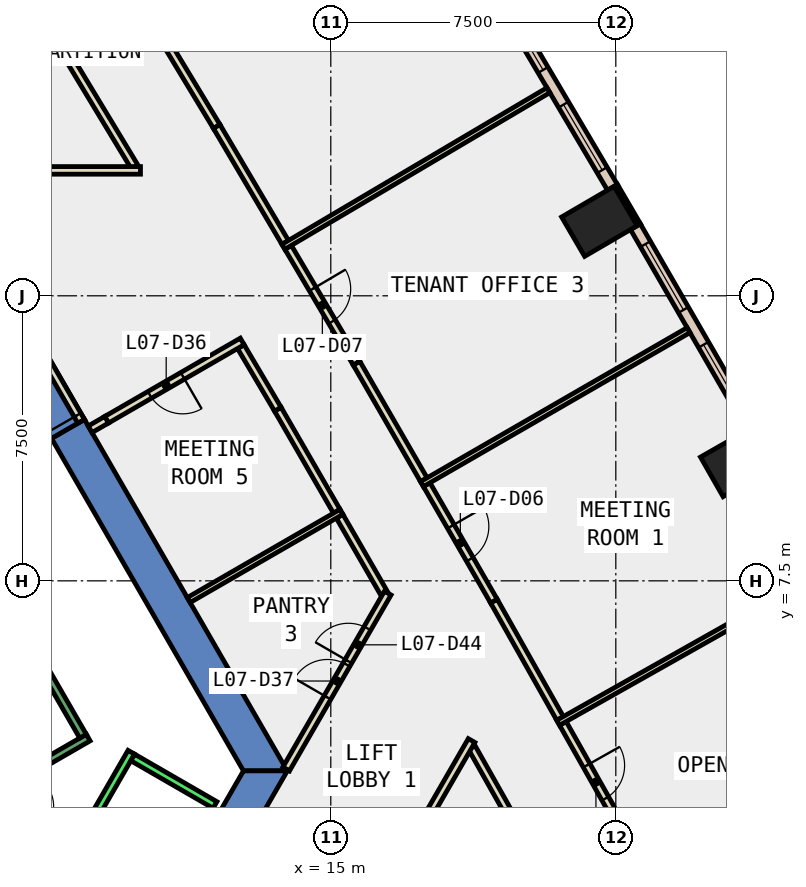
"""IFC4 building model, lengths in metres.
Left out: names, types, materials, properties, quantities, classifications, styles, units other than length and angle.
Written with IfcOpenShell. Run it as: python <this file> out.ifc"""

import sys

from ifc_helpers import new_model, si_unit, direction, frame, frame_2d, origin, origin_2d, place, context, subcontext, project, spatial, polyline, rectangle, outline, extrude, element, fill, save


model = new_model("IFC4")
c1 = context("Model", 3, precision=1e-05, world=origin(), true_north=direction((0.0, 1.0)))
c2 = subcontext(c1, "Body", "Model", "MODEL_VIEW")
j1 = project(units=[si_unit("LENGTHUNIT", "METRE"), si_unit("PLANEANGLEUNIT", "RADIAN")], contexts=[c1])
p1 = place(None, origin())
s1 = spatial("IfcSite", under=j1, at=p1, CompositionType="ELEMENT")
p2 = place(p1, origin())
s2 = spatial("IfcBuilding", under=s1, at=p2, CompositionType="ELEMENT")
p3 = place(p2, frame((0.0, 0.0, 39.2)))
s3 = spatial("IfcBuildingStorey", under=s2, at=p3, CompositionType="ELEMENT", Elevation=39.2)
for number, where, z_axis, x_axis in (
    (1, (25.721, 10.632, -0.4), (0.0, 0.0, 1.0), (-0.496, 0.869, 0.0)),
    (2, (22.068, 16.959, -0.4), (0.0, 0.0, 1.0), (-0.504, 0.864, 0.0)),
):
    element("IfcColumn", number, at=place(p3, frame(where, z_axis=z_axis, x_axis=x_axis)), inside=s3, PredefinedType="COLUMN", context=c2, shape_type="SweptSolid", body=[
        extrude(rectangle(XDim=1.2, YDim=1.6, at=origin_2d()), origin(), (0.0, 0.0, 1.0), 4.2),
    ])
p4 = place(p3, frame((0.0, 0.0, -0.4)))
e3 = element("IfcWall", 3, at=p4, inside=s3, PredefinedType="SHEAR", context=c2, shape_type="SweptSolid", body=[
    extrude(outline(polyline([(8.517, 11.748), (7.651, 11.248), (12.702, 2.5), (13.856, 2.5), (8.517, 11.748)])), origin(), (0.0, 0.0, 1.0), 4.2),
])
p5 = place(p3, frame((0.0, 0.0, 3.6)))
e4 = element("IfcWall", 4, at=p5, inside=s3, PredefinedType="SHEAR", context=c2, shape_type="SweptSolid", body=[
    extrude(outline(polyline([(7.517, 13.48), (6.651, 12.98), (7.651, 11.248), (8.517, 11.748), (7.517, 13.48)])), origin(), (0.0, 0.0, 1.0), 0.2),
])
p6 = place(p3, frame((0.0, 0.0, -0.4)))
e5 = element("IfcWall", 5, at=p6, inside=s3, PredefinedType="SHEAR", context=c2, shape_type="SweptSolid", body=[
    extrude(outline(polyline([(11.801, 0.94), (12.667, 0.44), (13.856, 2.5), (12.702, 2.5), (11.801, 0.94)])), origin(), (0.0, 0.0, 1.0), 4.2),
])
p7 = place(p3, frame((23.104, 16.87, 0.0), z_axis=(0.0, 0.0, 1.0), x_axis=(-0.504313844903, 0.863520437418, 0.0)))
e6 = element("IfcWall", 6, at=p7, inside=s3, PredefinedType="STANDARD", context=c2, shape_type="SweptSolid", body=[
    extrude(rectangle(XDim=1.2, YDim=0.1, at=frame_2d((0.6, 0.0))), origin(), (0.0, 0.0, 1.0), 3.8),
])
p8 = place(p3, frame((26.073, 11.522, 0.0), z_axis=(0.0, 0.0, 1.0), x_axis=(-0.499976985038, 0.866038691071, 0.0)))
e7 = element("IfcWall", 7, at=p8, inside=s3, PredefinedType="STANDARD", context=c2, shape_type="SweptSolid", body=[
    extrude(rectangle(XDim=6.116, YDim=0.3, at=frame_2d((3.058, 0.0))), origin(), (0.0, 0.0, 1.0), 3.8),
])
p9 = place(p8, frame((0.529, 0.0, 0.9)))
e8 = element("IfcOpeningElement", 8, at=p9, cuts=e7, PredefinedType="OPENING", context=c2, shape_type="SweptSolid", body=[
    extrude(rectangle(XDim=2.0, YDim=2.6, at=frame_2d((1.0, 1.3))), frame((0.0, 0.16, 0.0), z_axis=(0.0, -1.0, 0.0), x_axis=(1.0, 0.0, 0.0)), (0.0, 0.0, 1.0), 0.32),
])
p10 = place(p8, frame((3.587, 0.0, 0.9)))
e9 = element("IfcOpeningElement", 9, at=p10, cuts=e7, PredefinedType="OPENING", context=c2, shape_type="SweptSolid", body=[
    extrude(rectangle(XDim=2.0, YDim=2.6, at=frame_2d((1.0, 1.3))), frame((0.0, 0.16, 0.0), z_axis=(0.0, -1.0, 0.0), x_axis=(1.0, 0.0, 0.0)), (0.0, 0.0, 1.0), 0.32),
])
p11 = place(p3, frame((22.411, 17.853, 0.0), z_axis=(0.0, 0.0, 1.0), x_axis=(-0.508749483145, 0.860914608658, 0.0)))
e10 = element("IfcWall", 10, at=p11, inside=s3, PredefinedType="STANDARD", context=c2, shape_type="SweptSolid", body=[
    extrude(rectangle(XDim=6.117, YDim=0.3, at=frame_2d((3.058, 0.0))), origin(), (0.0, 0.0, 1.0), 3.8),
])
p12 = place(p11, frame((0.529, 0.0, 0.9)))
e11 = element("IfcOpeningElement", 11, at=p12, cuts=e10, PredefinedType="OPENING", context=c2, shape_type="SweptSolid", body=[
    extrude(rectangle(XDim=2.0, YDim=2.6, at=frame_2d((1.0, 1.3))), frame((0.0, 0.16, 0.0), z_axis=(0.0, -1.0, 0.0), x_axis=(1.0, 0.0, 0.0)), (0.0, 0.0, 1.0), 0.32),
])
p13 = place(p11, frame((3.588, 0.0, 0.9)))
e12 = element("IfcOpeningElement", 12, at=p13, cuts=e10, PredefinedType="OPENING", context=c2, shape_type="SweptSolid", body=[
    extrude(rectangle(XDim=2.0, YDim=2.6, at=frame_2d((1.0, 1.3))), frame((0.0, 0.16, 0.0), z_axis=(0.0, -1.0, 0.0), x_axis=(1.0, 0.0, 0.0)), (0.0, 0.0, 1.0), 0.32),
])
p14 = place(p3, frame((15.157, 9.33, 0.0), z_axis=(0.0, 0.0, 1.0), x_axis=(-0.500058580706, 0.865991579556, 0.0)))
e13 = element("IfcWall", 13, at=p14, inside=s3, PredefinedType="PARTITIONING", context=c2, shape_type="SweptSolid", body=[
    extrude(rectangle(XDim=3.102, YDim=0.2, at=frame_2d((1.551, 0.0))), origin(), (0.0, 0.0, 1.0), 3.8),
])
p15 = place(p3, frame((13.606, 12.016, 0.0), z_axis=(0.0, 0.0, 1.0), x_axis=(-0.508832553058, 0.860865513857, 0.0)))
e14 = element("IfcWall", 14, at=p15, inside=s3, PredefinedType="PARTITIONING", context=c2, shape_type="SweptSolid", body=[
    extrude(rectangle(XDim=1.912, YDim=0.2, at=frame_2d((0.956, 0.0))), origin(), (0.0, 0.0, 1.0), 3.8),
])
p16 = place(p3, frame((12.669, 13.799, 0.0), z_axis=(0.0, 0.0, 1.0), x_axis=(-0.865966559136, -0.500101908074, 0.0)))
e15 = element("IfcWall", 15, at=p16, inside=s3, PredefinedType="PARTITIONING", context=c2, shape_type="SweptSolid", body=[
    extrude(rectangle(XDim=4.121, YDim=0.2, at=frame_2d((2.061, 0.0))), origin(), (0.0, 0.0, 1.0), 3.8),
])
p17 = place(p16, frame((1.81, 0.0, 0.0)))
e16 = element("IfcOpeningElement", 16, at=p17, cuts=e15, PredefinedType="OPENING", context=c2, shape_type="SweptSolid", body=[
    extrude(rectangle(XDim=1.0, YDim=2.1, at=frame_2d((0.5, 1.05))), frame((0.0, 0.11, 0.0), z_axis=(0.0, -1.0, 0.0), x_axis=(1.0, 0.0, 0.0)), (0.0, 0.0, 1.0), 0.22),
])
p18 = place(p3, frame((16.399, 7.178, 0.0), z_axis=(0.0, 0.0, 1.0), x_axis=(-0.499873332494, 0.866098522953, 0.0)))
e17 = element("IfcWall", 17, at=p18, inside=s3, PredefinedType="PARTITIONING", context=c2, shape_type="SweptSolid", body=[
    extrude(rectangle(XDim=2.334, YDim=0.2, at=frame_2d((1.167, 0.0))), origin(), (0.0, 0.0, 1.0), 3.8),
])
p19 = place(p3, frame((9.84, 18.386, 0.0), z_axis=(0.0, 0.0, 1.0), x_axis=(-0.51736780002, 0.85576314451, 0.0)))
e18 = element("IfcWall", 18, at=p19, inside=s3, PredefinedType="PARTITIONING", context=c2, shape_type="SweptSolid", body=[
    extrude(rectangle(XDim=7.018, YDim=0.2, at=frame_2d((3.509, 0.0))), origin(), (0.0, 0.0, 1.0), 3.8),
])
p20 = place(p3, frame((20.751, -0.505, 0.0), z_axis=(0.0, 0.0, 1.0), x_axis=(-0.491284712602, 0.870999041999, 0.0)))
e19 = element("IfcWall", 19, at=p20, inside=s3, PredefinedType="PARTITIONING", context=c2, shape_type="SweptSolid", body=[
    extrude(rectangle(XDim=4.166, YDim=0.2, at=frame_2d((2.083, 0.0))), origin(), (0.0, 0.0, 1.0), 3.8),
])
p21 = place(p3, frame((21.107, 3.749, 0.0), z_axis=(0.0, 0.0, 1.0), x_axis=(0.491268894998, -0.871007963687, 0.0)))
e20 = element("IfcWall", 20, at=p21, inside=s3, PredefinedType="PARTITIONING", context=c2, shape_type="SweptSolid", body=[
    extrude(rectangle(XDim=3.542, YDim=0.2, at=frame_2d((1.771, 0.0))), origin(), (0.0, 0.0, 1.0), 3.8),
])
p22 = place(p21, frame((1.271, 0.0, 0.0)))
e21 = element("IfcOpeningElement", 21, at=p22, cuts=e20, PredefinedType="OPENING", context=c2, shape_type="SweptSolid", body=[
    extrude(rectangle(XDim=1.0, YDim=2.1, at=frame_2d((0.5, 1.05))), frame((0.0, 0.11, 0.0), z_axis=(0.0, -1.0, 0.0), x_axis=(1.0, 0.0, 0.0)), (0.0, 0.0, 1.0), 0.22),
])
p23 = place(p3, frame((17.524, 10.031, 0.0), z_axis=(0.0, 0.0, 1.0), x_axis=(0.499861717316, -0.86610522661, 0.0)))
e22 = element("IfcWall", 22, at=p23, inside=s3, PredefinedType="PARTITIONING", context=c2, shape_type="SweptSolid", body=[
    extrude(rectangle(XDim=3.541, YDim=0.2, at=frame_2d((1.771, 0.0))), origin(), (0.0, 0.0, 1.0), 3.8),
])
p24 = place(p23, frame((1.27, 0.0, 0.0)))
e23 = element("IfcOpeningElement", 23, at=p24, cuts=e22, PredefinedType="OPENING", context=c2, shape_type="SweptSolid", body=[
    extrude(rectangle(XDim=1.0, YDim=2.1, at=frame_2d((0.5, 1.05))), frame((0.0, 0.11, 0.0), z_axis=(0.0, -1.0, 0.0), x_axis=(1.0, 0.0, 0.0)), (0.0, 0.0, 1.0), 0.22),
])
p25 = place(p3, frame((19.294, 6.964, 0.0), z_axis=(0.0, 0.0, 1.0), x_axis=(0.491148159943, -0.871076050058, 0.0)))
e24 = element("IfcWall", 24, at=p25, inside=s3, PredefinedType="PARTITIONING", context=c2, shape_type="SweptSolid", body=[
    extrude(rectangle(XDim=3.541, YDim=0.2, at=frame_2d((1.771, 0.0))), origin(), (0.0, 0.0, 1.0), 3.8),
])
p26 = place(p3, frame((13.877, 16.275, 0.0), z_axis=(0.0, 0.0, 1.0), x_axis=(0.508613166028, -0.860995149431, 0.0)))
e25 = element("IfcWall", 25, at=p26, inside=s3, PredefinedType="PARTITIONING", context=c2, shape_type="SweptSolid", body=[
    extrude(rectangle(XDim=3.541, YDim=0.2, at=frame_2d((1.771, 0.0))), origin(), (0.0, 0.0, 1.0), 3.8),
])
p27 = place(p26, frame((1.271, 0.0, 0.0)))
e26 = element("IfcOpeningElement", 26, at=p27, cuts=e25, PredefinedType="OPENING", context=c2, shape_type="SweptSolid", body=[
    extrude(rectangle(XDim=1.0, YDim=2.1, at=frame_2d((0.5, 1.05))), frame((0.0, 0.11, 0.0), z_axis=(0.0, -1.0, 0.0), x_axis=(1.0, 0.0, 0.0)), (0.0, 0.0, 1.0), 0.22),
])
p28 = place(p3, frame((15.678, 13.226, 0.0), z_axis=(0.0, 0.0, 1.0), x_axis=(0.499951278228, -0.866053531485, 0.0)))
e27 = element("IfcWall", 27, at=p28, inside=s3, PredefinedType="PARTITIONING", context=c2, shape_type="SweptSolid", body=[
    extrude(rectangle(XDim=3.54, YDim=0.2, at=frame_2d((1.77, 0.0))), origin(), (0.0, 0.0, 1.0), 3.8),
])
p29 = place(p3, frame((8.218, 25.708, 0.0), z_axis=(0.0, 0.0, 1.0), x_axis=(0.517278800461, -0.855816944559, 0.0)))
e28 = element("IfcWall", 28, at=p29, inside=s3, PredefinedType="PARTITIONING", context=c2, shape_type="SweptSolid", body=[
    extrude(rectangle(XDim=7.308, YDim=0.2, at=frame_2d((3.654, 0.0))), origin(), (0.0, 0.0, 1.0), 3.8),
])
p30 = place(p29, frame((3.154, 0.0, 0.0)))
e29 = element("IfcOpeningElement", 29, at=p30, cuts=e28, PredefinedType="OPENING", context=c2, shape_type="SweptSolid", body=[
    extrude(rectangle(XDim=1.0, YDim=2.1, at=frame_2d((0.5, 1.05))), frame((0.0, 0.11, 0.0), z_axis=(0.0, -1.0, 0.0), x_axis=(1.0, 0.0, 0.0)), (0.0, 0.0, 1.0), 0.22),
])
p31 = place(p3, frame((11.998, 19.454, 0.0), z_axis=(0.0, 0.0, 1.0), x_axis=(0.508666621784, -0.860963569428, 0.0)))
e30 = element("IfcWall", 30, at=p31, inside=s3, PredefinedType="PARTITIONING", context=c2, shape_type="SweptSolid", body=[
    extrude(rectangle(XDim=3.542, YDim=0.2, at=frame_2d((1.771, 0.0))), origin(), (0.0, 0.0, 1.0), 3.8),
])
p32 = place(p3, frame((6.25, 1.894, 0.0), z_axis=(0.0, 0.0, 1.0), x_axis=(0.866043184279, -0.499969202016, 0.0)))
e31 = element("IfcWall", 31, at=p32, inside=s3, PredefinedType="PARTITIONING", context=c2, shape_type="SweptSolid", body=[
    extrude(rectangle(XDim=2.084, YDim=0.2, at=frame_2d((1.042, 0.0))), origin(), (0.0, 0.0, 1.0), 3.8),
])
p33 = place(p32, frame((0.642, 0.0, 0.0)))
e32 = element("IfcOpeningElement", 32, at=p33, cuts=e31, PredefinedType="OPENING", context=c2, shape_type="SweptSolid", body=[
    extrude(rectangle(XDim=0.9, YDim=2.1, at=frame_2d((0.45, 1.05))), frame((0.0, 0.11, 0.0), z_axis=(0.0, -1.0, 0.0), x_axis=(1.0, 0.0, 0.0)), (0.0, 0.0, 1.0), 0.22),
])
p34 = place(p3, frame((15.281, 9.315, 0.0), z_axis=(0.0, 0.0, 1.0), x_axis=(-0.86601742213, -0.500013824377, 0.0)))
e33 = element("IfcWall", 33, at=p34, inside=s3, PredefinedType="PARTITIONING", context=c2, shape_type="SweptSolid", body=[
    extrude(rectangle(XDim=4.642, YDim=0.15, at=frame_2d((2.321, 0.0))), origin(), (0.0, 0.0, 1.0), 3.8),
])
p35 = place(p3, frame((13.827, 2.55, 0.0), z_axis=(0.0, 0.0, 1.0), x_axis=(0.50002563942, 0.866010600352, 0.0)))
e34 = element("IfcWall", 34, at=p35, inside=s3, PredefinedType="PARTITIONING", context=c2, shape_type="SweptSolid", body=[
    extrude(rectangle(XDim=5.344, YDim=0.2, at=frame_2d((2.672, 0.0))), origin(), (0.0, 0.0, 1.0), 3.8),
])
p36 = place(p35, frame((2.172, 0.0, 0.0)))
e35 = element("IfcOpeningElement", 35, at=p36, cuts=e34, PredefinedType="OPENING", context=c2, shape_type="SweptSolid", body=[
    extrude(rectangle(XDim=1.0, YDim=2.1, at=frame_2d((0.5, 1.05))), frame((0.0, 0.11, 0.0), z_axis=(0.0, -1.0, 0.0), x_axis=(1.0, 0.0, 0.0)), (0.0, 0.0, 1.0), 0.22),
])
p37 = place(p35, frame((3.272, 0.0, 0.0)))
e36 = element("IfcOpeningElement", 36, at=p37, cuts=e34, PredefinedType="OPENING", context=c2, shape_type="SweptSolid", body=[
    extrude(rectangle(XDim=1.0, YDim=2.1, at=frame_2d((0.5, 1.05))), frame((0.0, 0.11, 0.0), z_axis=(0.0, -1.0, 0.0), x_axis=(1.0, 0.0, 0.0)), (0.0, 0.0, 1.0), 0.22),
])
p38 = place(p3, frame((18.705, 3.298, 0.0), z_axis=(0.0, 0.0, 1.0), x_axis=(-0.499993769413, -0.866029000986, 0.0)))
e37 = element("IfcWall", 37, at=p38, inside=s3, PredefinedType="PARTITIONING", context=c2, shape_type="SweptSolid", body=[
    extrude(rectangle(XDim=7.166, YDim=0.2, at=frame_2d((3.583, 0.0))), origin(), (0.0, 0.0, 1.0), 3.8),
])
p39 = place(p3, frame((20.983, 3.766, 0.0), z_axis=(0.0, 0.0, 1.0), x_axis=(0.871022781656, 0.491242622169, 0.0)))
e38 = element("IfcWall", 38, at=p39, inside=s3, PredefinedType="PARTITIONING", context=c2, shape_type="SweptSolid", body=[
    extrude(rectangle(XDim=8.1, YDim=0.15, at=frame_2d((4.05, 0.0))), origin(), (0.0, 0.0, 1.0), 3.8),
])
p40 = place(p3, frame((17.399, 10.045, 0.0), z_axis=(0.0, 0.0, 1.0), x_axis=(0.865980803489, 0.500077242023, 0.0)))
e39 = element("IfcWall", 39, at=p40, inside=s3, PredefinedType="PARTITIONING", context=c2, shape_type="SweptSolid", body=[
    extrude(rectangle(XDim=8.101, YDim=0.15, at=frame_2d((4.05, 0.0))), origin(), (0.0, 0.0, 1.0), 3.8),
])
p41 = place(p3, frame((13.752, 16.289, 0.0), z_axis=(0.0, 0.0, 1.0), x_axis=(0.86093852802, 0.508709004216, 0.0)))
e40 = element("IfcWall", 40, at=p41, inside=s3, PredefinedType="PARTITIONING", context=c2, shape_type="SweptSolid", body=[
    extrude(rectangle(XDim=8.101, YDim=0.15, at=frame_2d((4.05, 0.0))), origin(), (0.0, 0.0, 1.0), 3.8),
])
p42 = place(p3, frame((8.43, 11.698, 0.0), z_axis=(0.0, 0.0, 1.0), x_axis=(-0.50002537861, 0.866010750942, 0.0)))
e41 = element("IfcWall", 41, at=p42, inside=s3, PredefinedType="PARTITIONING", context=c2, shape_type="SweptSolid", body=[
    extrude(rectangle(XDim=2.0, YDim=0.2, at=frame_2d((1.0, 0.0))), origin(), (0.0, 0.0, 1.0), 2.4),
])
p43 = place(p42, frame((0.19, 0.0, 0.0)))
e42 = element("IfcOpeningElement", 42, at=p43, cuts=e41, PredefinedType="OPENING", context=c2, shape_type="SweptSolid", body=[
    extrude(rectangle(XDim=1.8, YDim=2.1, at=frame_2d((0.9, 1.05))), frame((0.0, 0.11, 0.0), z_axis=(0.0, -1.0, 0.0), x_axis=(1.0, 0.0, 0.0)), (0.0, 0.0, 1.0), 0.22),
])
p44 = place(p3, frame((0.4, 18.3, 0.0), z_axis=(0.0, 0.0, 1.0), x_axis=(1.0, 0.0, 0.0)))
e43 = element("IfcWall", 43, at=p44, inside=s3, PredefinedType="PARTITIONING", context=c2, shape_type="SweptSolid", body=[
    extrude(rectangle(XDim=9.592, YDim=0.2, at=frame_2d((4.796, 0.0))), origin(), (0.0, 0.0, 1.0), 3.8),
])
p45 = place(p3, frame((9.1, 11.738, 0.0), z_axis=(0.0, 0.0, 1.0), x_axis=(-0.866071776036, -0.499919672301, 0.0)))
e44 = element("IfcWall", 44, at=p45, inside=s3, PredefinedType="PARTITIONING", context=c2, shape_type="SweptSolid", body=[
    extrude(rectangle(XDim=0.5, YDim=0.2, at=frame_2d((0.25, 0.0))), origin(), (0.0, 0.0, 1.0), 2.4),
])
p46 = place(p3, frame((4.451, -6.19, 0.0), z_axis=(0.0, 0.0, 1.0), x_axis=(0.50000090737, 0.866024879913, 0.0)))
e45 = element("IfcWall", 45, at=p46, inside=s3, PredefinedType="STANDARD", context=c2, shape_type="SweptSolid", body=[
    extrude(rectangle(XDim=10.6, YDim=0.2, at=frame_2d((5.3, 0.0))), origin(), (0.0, 0.0, 1.0), 3.8),
])
p47 = place(p3, frame((9.788, 2.853, 0.0), z_axis=(0.0, 0.0, 1.0), x_axis=(0.865998541277, -0.500046524342, 0.0)))
e46 = element("IfcWall", 46, at=p47, inside=s3, PredefinedType="STANDARD", context=c2, shape_type="SweptSolid", body=[
    extrude(rectangle(XDim=2.5, YDim=0.2, at=frame_2d((1.25, 0.0))), origin(), (0.0, 0.0, 1.0), 3.8),
])
p48 = place(p3, frame((4.806, 1.176, 0.0), z_axis=(0.0, 0.0, 1.0), x_axis=(0.866059941101, 0.499940174841, 0.0)))
e47 = element("IfcWall", 47, at=p48, inside=s3, PredefinedType="STANDARD", context=c2, shape_type="SweptSolid", body=[
    extrude(rectangle(XDim=4.4, YDim=0.2, at=frame_2d((2.2, 0.0))), origin(), (0.0, 0.0, 1.0), 3.8),
])
p49 = place(p48, frame((1.65, 0.0, 0.0)))
e48 = element("IfcOpeningElement", 48, at=p49, cuts=e47, PredefinedType="OPENING", context=c2, shape_type="SweptSolid", body=[
    extrude(rectangle(XDim=1.1, YDim=2.2, at=frame_2d((0.55, 1.1))), frame((0.0, 0.11, 0.0), z_axis=(0.0, -1.0, 0.0), x_axis=(1.0, 0.0, 0.0)), (0.0, 0.0, 1.0), 0.22),
])
p50 = place(p3, frame((8.48, 3.412, 0.0), z_axis=(0.0, 0.0, 1.0), x_axis=(-0.499978703459, 0.866037698999, 0.0)))
e49 = element("IfcWall", 49, at=p50, inside=s3, PredefinedType="STANDARD", context=c2, shape_type="SweptSolid", body=[
    extrude(rectangle(XDim=6.9, YDim=0.2, at=frame_2d((3.45, 0.0))), origin(), (0.0, 0.0, 1.0), 3.8),
])
p51 = place(p9, origin())
e50 = element("IfcWindow", 50, at=p51, inside=s3, PartitioningType="SINGLE_PANEL", PredefinedType="WINDOW", context=c2, shape_type="SweptSolid", body=[
    extrude(rectangle(XDim=2.0, YDim=2.6, at=frame_2d((1.0, 1.3))), frame((0.0, 0.03, 0.0), z_axis=(0.0, -1.0, 0.0), x_axis=(1.0, 0.0, 0.0)), (0.0, 0.0, 1.0), 0.06),
])
fill(e8, e50)
p52 = place(p10, origin())
e51 = element("IfcWindow", 51, at=p52, inside=s3, PartitioningType="SINGLE_PANEL", PredefinedType="WINDOW", context=c2, shape_type="SweptSolid", body=[
    extrude(rectangle(XDim=2.0, YDim=2.6, at=frame_2d((1.0, 1.3))), frame((0.0, 0.03, 0.0), z_axis=(0.0, -1.0, 0.0), x_axis=(1.0, 0.0, 0.0)), (0.0, 0.0, 1.0), 0.06),
])
fill(e9, e51)
p53 = place(p12, origin())
e52 = element("IfcWindow", 52, at=p53, inside=s3, PartitioningType="SINGLE_PANEL", PredefinedType="WINDOW", context=c2, shape_type="SweptSolid", body=[
    extrude(rectangle(XDim=2.0, YDim=2.6, at=frame_2d((1.0, 1.3))), frame((0.0, 0.03, 0.0), z_axis=(0.0, -1.0, 0.0), x_axis=(1.0, 0.0, 0.0)), (0.0, 0.0, 1.0), 0.06),
])
fill(e11, e52)
p54 = place(p13, origin())
e53 = element("IfcWindow", 53, at=p54, inside=s3, PartitioningType="SINGLE_PANEL", PredefinedType="WINDOW", context=c2, shape_type="SweptSolid", body=[
    extrude(rectangle(XDim=2.0, YDim=2.6, at=frame_2d((1.0, 1.3))), frame((0.0, 0.03, 0.0), z_axis=(0.0, -1.0, 0.0), x_axis=(1.0, 0.0, 0.0)), (0.0, 0.0, 1.0), 0.06),
])
fill(e12, e53)
p55 = place(p22, origin())
e54 = element("IfcDoor", 54, at=p55, inside=s3, OperationType="SINGLE_SWING_LEFT", PredefinedType="DOOR", context=c2, shape_type="SweptSolid", body=[
    extrude(rectangle(XDim=1.0, YDim=2.1, at=frame_2d((0.5, 1.05))), frame((0.0, 0.025, 0.0), z_axis=(0.0, -1.0, 0.0), x_axis=(1.0, 0.0, 0.0)), (0.0, 0.0, 1.0), 0.05),
])
fill(e21, e54)
p56 = place(p24, origin())
e55 = element("IfcDoor", 55, at=p56, inside=s3, OperationType="SINGLE_SWING_LEFT", PredefinedType="DOOR", context=c2, shape_type="SweptSolid", body=[
    extrude(rectangle(XDim=1.0, YDim=2.1, at=frame_2d((0.5, 1.05))), frame((0.0, 0.025, 0.0), z_axis=(0.0, -1.0, 0.0), x_axis=(1.0, 0.0, 0.0)), (0.0, 0.0, 1.0), 0.05),
])
fill(e23, e55)
p57 = place(p27, origin())
e56 = element("IfcDoor", 56, at=p57, inside=s3, OperationType="SINGLE_SWING_LEFT", PredefinedType="DOOR", context=c2, shape_type="SweptSolid", body=[
    extrude(rectangle(XDim=1.0, YDim=2.1, at=frame_2d((0.5, 1.05))), frame((0.0, 0.025, 0.0), z_axis=(0.0, -1.0, 0.0), x_axis=(1.0, 0.0, 0.0)), (0.0, 0.0, 1.0), 0.05),
])
fill(e26, e56)
p58 = place(p17, origin())
e57 = element("IfcDoor", 57, at=p58, inside=s3, OperationType="SINGLE_SWING_LEFT", PredefinedType="DOOR", context=c2, shape_type="SweptSolid", body=[
    extrude(rectangle(XDim=1.0, YDim=2.1, at=frame_2d((0.5, 1.05))), frame((0.0, 0.025, 0.0), z_axis=(0.0, -1.0, 0.0), x_axis=(1.0, 0.0, 0.0)), (0.0, 0.0, 1.0), 0.05),
])
fill(e16, e57)
p59 = place(p36, origin())
e58 = element("IfcDoor", 58, at=p59, inside=s3, OperationType="SINGLE_SWING_LEFT", PredefinedType="DOOR", context=c2, shape_type="SweptSolid", body=[
    extrude(rectangle(XDim=1.0, YDim=2.1, at=frame_2d((0.5, 1.05))), frame((0.0, 0.025, 0.0), z_axis=(0.0, -1.0, 0.0), x_axis=(1.0, 0.0, 0.0)), (0.0, 0.0, 1.0), 0.05),
])
fill(e35, e58)
p60 = place(p37, origin())
e59 = element("IfcDoor", 59, at=p60, inside=s3, OperationType="SINGLE_SWING_RIGHT", PredefinedType="DOOR", context=c2, shape_type="SweptSolid", body=[
    extrude(rectangle(XDim=1.0, YDim=2.1, at=frame_2d((0.5, 1.05))), frame((0.0, 0.025, 0.0), z_axis=(0.0, -1.0, 0.0), x_axis=(1.0, 0.0, 0.0)), (0.0, 0.0, 1.0), 0.05),
])
fill(e36, e59)
p61 = place(p43, origin())
e60 = element("IfcDoor", 60, at=p61, inside=s3, OperationType="DOUBLE_DOOR_SINGLE_SWING", PredefinedType="DOOR", context=c2, shape_type="SweptSolid", body=[
    extrude(rectangle(XDim=1.8, YDim=2.1, at=frame_2d((0.9, 1.05))), frame((0.0, 0.025, 0.0), z_axis=(0.0, -1.0, 0.0), x_axis=(1.0, 0.0, 0.0)), (0.0, 0.0, 1.0), 0.05),
])
fill(e42, e60)
save(model, sys.argv[1])
